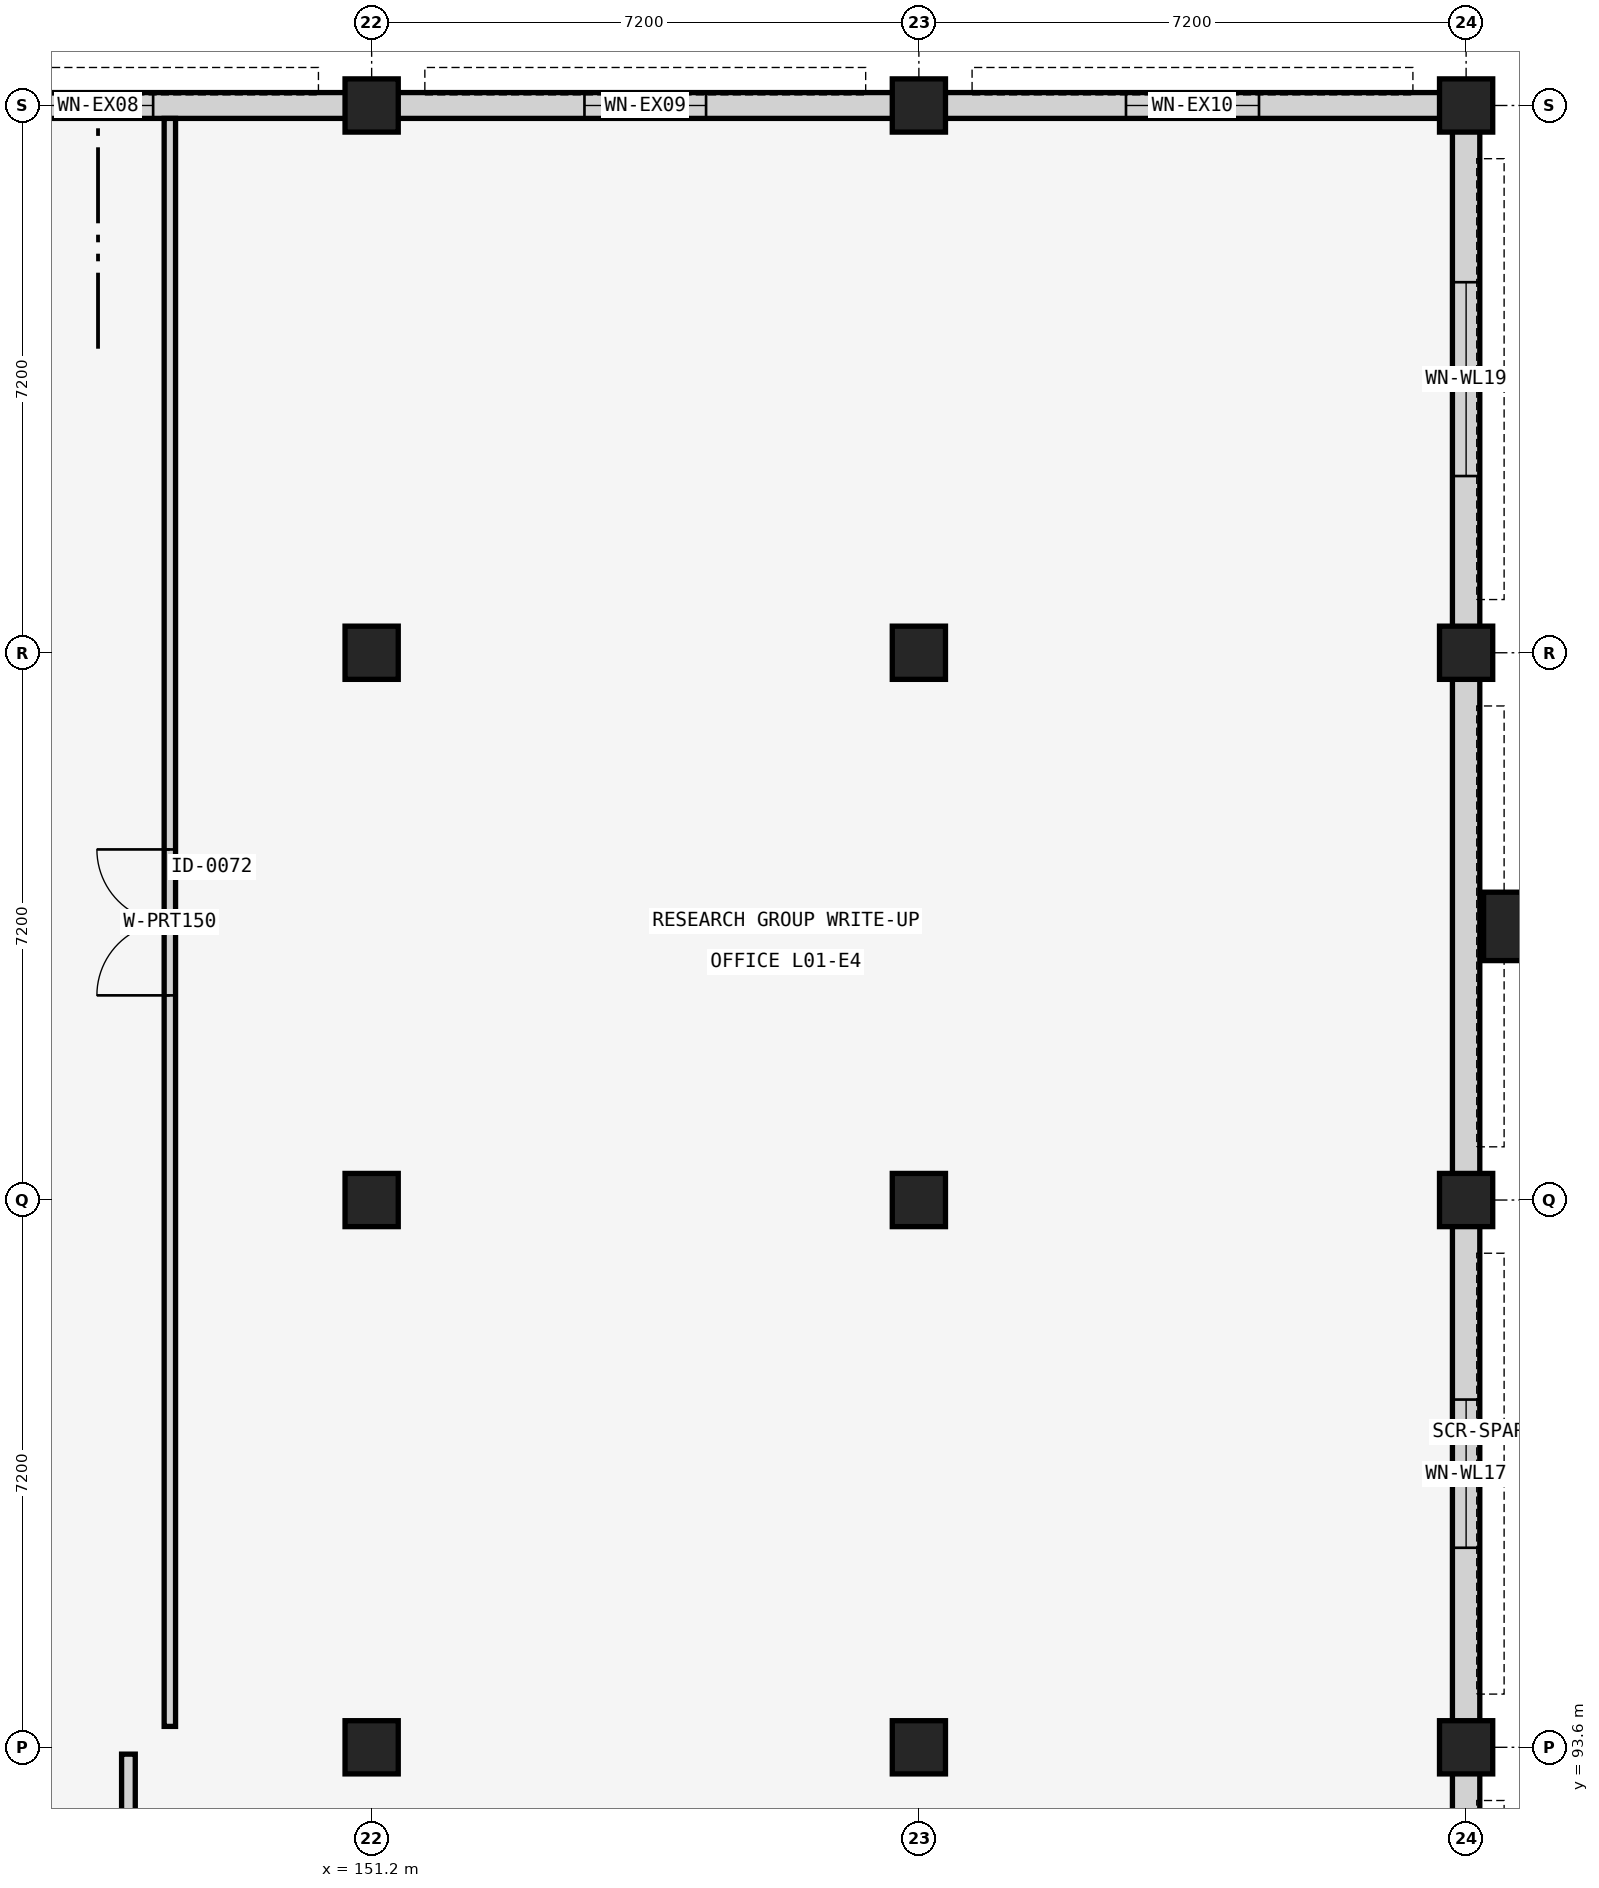
"""IFC4 building model, lengths in metres.
Left out: names, types, materials, properties, quantities, classifications, styles, units other than length and angle.
Written with IfcOpenShell. Run it as: python <this file> out.ifc"""

import sys

from ifc_helpers import new_model, si_unit, direction, frame, frame_2d, origin, origin_2d, place, context, subcontext, project, spatial, rectangle, extrude, element, fill, save


model = new_model("IFC4")
c1 = context("Model", 3, precision=1e-05, world=origin(), true_north=direction((0.0, 1.0)))
c2 = subcontext(c1, "Body", "Model", "MODEL_VIEW")
j1 = project(units=[si_unit("LENGTHUNIT", "METRE"), si_unit("PLANEANGLEUNIT", "RADIAN")], contexts=[c1])
p1 = place(None, origin())
s1 = spatial("IfcSite", under=j1, at=p1, CompositionType="ELEMENT")
p2 = place(p1, origin())
s2 = spatial("IfcBuilding", under=s1, at=p2, CompositionType="ELEMENT")
p3 = place(p2, frame((0.0, 0.0, 4.8)))
s3 = spatial("IfcBuildingStorey", under=s2, at=p3, CompositionType="ELEMENT", Elevation=4.8)
for number, where, z_axis, x_axis in (
    (1, (151.2, 93.6, 0.0), (0.0, 0.0, 1.0), (1.0, 0.0, 0.0)),
    (2, (151.2, 100.8, 0.0), (0.0, 0.0, 1.0), (1.0, 0.0, 0.0)),
    (3, (151.2, 108.0, 0.0), (0.0, 0.0, 1.0), (1.0, 0.0, 0.0)),
    (4, (151.2, 115.2, 0.0), (0.0, 0.0, 1.0), (1.0, 0.0, 0.0)),
    (5, (158.4, 93.6, 0.0), (0.0, 0.0, 1.0), (1.0, 0.0, 0.0)),
    (6, (158.4, 100.8, 0.0), (0.0, 0.0, 1.0), (1.0, 0.0, 0.0)),
    (7, (158.4, 108.0, 0.0), (0.0, 0.0, 1.0), (1.0, 0.0, 0.0)),
    (8, (158.4, 115.2, 0.0), (0.0, 0.0, 1.0), (1.0, 0.0, 0.0)),
    (9, (165.6, 93.6, 0.0), (0.0, 0.0, 1.0), (1.0, 0.0, 0.0)),
    (10, (165.6, 100.8, 0.0), (0.0, 0.0, 1.0), (1.0, 0.0, 0.0)),
    (11, (165.6, 108.0, 0.0), (0.0, 0.0, 1.0), (1.0, 0.0, 0.0)),
    (12, (165.6, 115.2, 0.0), (0.0, 0.0, 1.0), (1.0, 0.0, 0.0)),
):
    element("IfcColumn", number, at=place(p3, frame(where, z_axis=z_axis, x_axis=x_axis)), inside=s3, PredefinedType="COLUMN", context=c2, shape_type="SweptSolid", body=[
        extrude(rectangle(XDim=0.7, YDim=0.7, at=origin_2d()), origin(), (0.0, 0.0, 1.0), 4.16),
    ])
p4 = place(p3, frame((166.08, 104.4, 0.0), z_axis=(0.0, 0.0, 1.0), x_axis=(1.0, 0.0, 0.0)))
e13 = element("IfcColumn", 13, at=p4, inside=s3, PredefinedType="PILASTER", context=c2, shape_type="SweptSolid", body=[
    extrude(rectangle(XDim=0.5, YDim=0.9, at=origin_2d()), origin(), (0.0, 0.0, 1.0), 4.16),
])
p5 = place(p3, frame((165.6, 86.74, 0.0), z_axis=(0.0, 0.0, 1.0), x_axis=(0.0, 1.0, 0.0)))
e14 = element("IfcWall", 14, at=p5, inside=s3, PredefinedType="SOLIDWALL", context=c2, shape_type="SweptSolid", body=[
    extrude(rectangle(XDim=6.52, YDim=0.36, at=frame_2d((3.26, 0.0))), origin(), (0.0, 0.0, 1.0), 3.11),
])
p6 = place(p5, frame((2.435, 0.0, 0.95)))
e15 = element("IfcOpeningElement", 15, at=p6, cuts=e14, PredefinedType="OPENING", context=c2, shape_type="SweptSolid", body=[
    extrude(rectangle(XDim=1.65, YDim=1.95, at=frame_2d((0.825, 0.975))), frame((0.0, 0.19, 0.0), z_axis=(0.0, -1.0, 0.0), x_axis=(1.0, 0.0, 0.0)), (0.0, 0.0, 1.0), 0.38),
])
p7 = place(p3, frame((165.6, 93.94, 0.0), z_axis=(0.0, 0.0, 1.0), x_axis=(0.0, 1.0, 0.0)))
e16 = element("IfcWall", 16, at=p7, inside=s3, PredefinedType="SOLIDWALL", context=c2, shape_type="SweptSolid", body=[
    extrude(rectangle(XDim=6.52, YDim=0.36, at=frame_2d((3.26, 0.0))), origin(), (0.0, 0.0, 1.0), 3.11),
])
p8 = place(p7, frame((2.285, 0.0, 0.95)))
e17 = element("IfcOpeningElement", 17, at=p8, cuts=e16, PredefinedType="OPENING", context=c2, shape_type="SweptSolid", body=[
    extrude(rectangle(XDim=1.95, YDim=1.95, at=frame_2d((0.975, 0.975))), frame((0.0, 0.19, 0.0), z_axis=(0.0, -1.0, 0.0), x_axis=(1.0, 0.0, 0.0)), (0.0, 0.0, 1.0), 0.38),
])
p9 = place(p3, frame((165.6, 101.14, 0.0), z_axis=(0.0, 0.0, 1.0), x_axis=(0.0, 1.0, 0.0)))
e18 = element("IfcWall", 18, at=p9, inside=s3, PredefinedType="SOLIDWALL", context=c2, shape_type="SweptSolid", body=[
    extrude(rectangle(XDim=6.52, YDim=0.36, at=frame_2d((3.26, 0.0))), origin(), (0.0, 0.0, 1.0), 3.11),
])
p10 = place(p3, frame((165.6, 108.34, 0.0), z_axis=(0.0, 0.0, 1.0), x_axis=(0.0, 1.0, 0.0)))
e19 = element("IfcWall", 19, at=p10, inside=s3, PredefinedType="SOLIDWALL", context=c2, shape_type="SweptSolid", body=[
    extrude(rectangle(XDim=6.52, YDim=0.36, at=frame_2d((3.26, 0.0))), origin(), (0.0, 0.0, 1.0), 3.11),
])
p11 = place(p10, frame((1.985, 0.0, 0.95)))
e20 = element("IfcOpeningElement", 20, at=p11, cuts=e19, PredefinedType="OPENING", context=c2, shape_type="SweptSolid", body=[
    extrude(rectangle(XDim=2.55, YDim=1.95, at=frame_2d((1.275, 0.975))), frame((0.0, 0.19, 0.0), z_axis=(0.0, -1.0, 0.0), x_axis=(1.0, 0.0, 0.0)), (0.0, 0.0, 1.0), 0.38),
])
p12 = place(p3, frame((144.34, 115.2, 0.0), z_axis=(0.0, 0.0, 1.0), x_axis=(1.0, 0.0, 0.0)))
e21 = element("IfcWall", 21, at=p12, inside=s3, PredefinedType="SOLIDWALL", context=c2, shape_type="SweptSolid", body=[
    extrude(rectangle(XDim=6.52, YDim=0.34, at=frame_2d((3.26, 0.0))), origin(), (0.0, 0.0, 1.0), 3.21),
])
p13 = place(p12, frame((2.535, 0.0, 0.95)))
e22 = element("IfcOpeningElement", 22, at=p13, cuts=e21, PredefinedType="OPENING", context=c2, shape_type="SweptSolid", body=[
    extrude(rectangle(XDim=1.45, YDim=2.0, at=frame_2d((0.725, 1.0))), frame((0.0, 0.18, 0.0), z_axis=(0.0, -1.0, 0.0), x_axis=(1.0, 0.0, 0.0)), (0.0, 0.0, 1.0), 0.36),
])
p14 = place(p3, frame((151.54, 115.2, 0.0), z_axis=(0.0, 0.0, 1.0), x_axis=(1.0, 0.0, 0.0)))
e23 = element("IfcWall", 23, at=p14, inside=s3, PredefinedType="SOLIDWALL", context=c2, shape_type="SweptSolid", body=[
    extrude(rectangle(XDim=6.52, YDim=0.34, at=frame_2d((3.26, 0.0))), origin(), (0.0, 0.0, 1.0), 3.21),
])
p15 = place(p14, frame((2.46, 0.0, 0.95)))
e24 = element("IfcOpeningElement", 24, at=p15, cuts=e23, PredefinedType="OPENING", context=c2, shape_type="SweptSolid", body=[
    extrude(rectangle(XDim=1.6, YDim=1.7, at=frame_2d((0.8, 0.85))), frame((0.0, 0.18, 0.0), z_axis=(0.0, -1.0, 0.0), x_axis=(1.0, 0.0, 0.0)), (0.0, 0.0, 1.0), 0.36),
])
p16 = place(p3, frame((158.74, 115.2, 0.0), z_axis=(0.0, 0.0, 1.0), x_axis=(1.0, 0.0, 0.0)))
e25 = element("IfcWall", 25, at=p16, inside=s3, PredefinedType="SOLIDWALL", context=c2, shape_type="SweptSolid", body=[
    extrude(rectangle(XDim=6.52, YDim=0.34, at=frame_2d((3.26, 0.0))), origin(), (0.0, 0.0, 1.0), 3.21),
])
p17 = place(p16, frame((2.385, 0.0, 0.95)))
e26 = element("IfcOpeningElement", 26, at=p17, cuts=e25, PredefinedType="OPENING", context=c2, shape_type="SweptSolid", body=[
    extrude(rectangle(XDim=1.75, YDim=1.7, at=frame_2d((0.875, 0.85))), frame((0.0, 0.18, 0.0), z_axis=(0.0, -1.0, 0.0), x_axis=(1.0, 0.0, 0.0)), (0.0, 0.0, 1.0), 0.36),
])
p18 = place(p3, frame((148.0, 71.89, 0.0), z_axis=(0.0, 0.0, 1.0), x_axis=(0.0, 1.0, 0.0)))
e27 = element("IfcWall", 27, at=p18, inside=s3, PredefinedType="PARTITIONING", context=c2, shape_type="SweptSolid", body=[
    extrude(rectangle(XDim=21.62, YDim=0.18, at=frame_2d((10.81, 0.0))), origin(), (0.0, 0.0, 1.0), 3.11),
])
p19 = place(p18, frame((9.89, 0.0, 0.0)))
e28 = element("IfcOpeningElement", 28, at=p19, cuts=e27, PredefinedType="OPENING", context=c2, shape_type="SweptSolid", body=[
    extrude(rectangle(XDim=1.84, YDim=2.26, at=frame_2d((0.92, 1.13))), frame((0.0, 0.1, 0.0), z_axis=(0.0, -1.0, 0.0), x_axis=(1.0, 0.0, 0.0)), (0.0, 0.0, 1.0), 0.2),
])
p20 = place(p3, frame((148.545, 93.875, 0.0), z_axis=(0.0, 0.0, 1.0), x_axis=(0.0, 1.0, 0.0)))
e29 = element("IfcWall", 29, at=p20, inside=s3, PredefinedType="PARTITIONING", context=c2, shape_type="SweptSolid", body=[
    extrude(rectangle(XDim=21.155, YDim=0.15, at=frame_2d((10.578, 0.0))), origin(), (0.0, 0.0, 1.0), 3.11),
])
p21 = place(p20, frame((9.617, 0.0, 0.0)))
e30 = element("IfcOpeningElement", 30, at=p21, cuts=e29, PredefinedType="OPENING", context=c2, shape_type="SweptSolid", body=[
    extrude(rectangle(XDim=1.92, YDim=2.28, at=frame_2d((0.96, 1.14))), frame((0.0, 0.085, 0.0), z_axis=(0.0, -1.0, 0.0), x_axis=(1.0, 0.0, 0.0)), (0.0, 0.0, 1.0), 0.17),
])
p22 = place(p8, origin())
e31 = element("IfcWindow", 31, at=p22, inside=s3, PartitioningType="SINGLE_PANEL", PredefinedType="WINDOW", context=c2, shape_type="SweptSolid", body=[
    extrude(rectangle(XDim=1.95, YDim=1.95, at=frame_2d((0.975, 0.975))), frame((0.0, 0.03, 0.0), z_axis=(0.0, -1.0, 0.0), x_axis=(1.0, 0.0, 0.0)), (0.0, 0.0, 1.0), 0.06),
])
fill(e17, e31)
p23 = place(p11, origin())
e32 = element("IfcWindow", 32, at=p23, inside=s3, PartitioningType="SINGLE_PANEL", PredefinedType="WINDOW", context=c2, shape_type="SweptSolid", body=[
    extrude(rectangle(XDim=2.55, YDim=1.95, at=frame_2d((1.275, 0.975))), frame((0.0, 0.03, 0.0), z_axis=(0.0, -1.0, 0.0), x_axis=(1.0, 0.0, 0.0)), (0.0, 0.0, 1.0), 0.06),
])
fill(e20, e32)
p24 = place(p13, origin())
e33 = element("IfcWindow", 33, at=p24, inside=s3, PartitioningType="SINGLE_PANEL", PredefinedType="WINDOW", context=c2, shape_type="SweptSolid", body=[
    extrude(rectangle(XDim=1.45, YDim=2.0, at=frame_2d((0.725, 1.0))), frame((0.0, 0.03, 0.0), z_axis=(0.0, -1.0, 0.0), x_axis=(1.0, 0.0, 0.0)), (0.0, 0.0, 1.0), 0.06),
])
fill(e22, e33)
p25 = place(p15, origin())
e34 = element("IfcWindow", 34, at=p25, inside=s3, PartitioningType="SINGLE_PANEL", PredefinedType="WINDOW", context=c2, shape_type="SweptSolid", body=[
    extrude(rectangle(XDim=1.6, YDim=1.7, at=frame_2d((0.8, 0.85))), frame((0.0, 0.03, 0.0), z_axis=(0.0, -1.0, 0.0), x_axis=(1.0, 0.0, 0.0)), (0.0, 0.0, 1.0), 0.06),
])
fill(e24, e34)
p26 = place(p17, origin())
e35 = element("IfcWindow", 35, at=p26, inside=s3, PartitioningType="SINGLE_PANEL", PredefinedType="WINDOW", context=c2, shape_type="SweptSolid", body=[
    extrude(rectangle(XDim=1.75, YDim=1.7, at=frame_2d((0.875, 0.85))), frame((0.0, 0.03, 0.0), z_axis=(0.0, -1.0, 0.0), x_axis=(1.0, 0.0, 0.0)), (0.0, 0.0, 1.0), 0.06),
])
fill(e26, e35)
p27 = place(p21, origin())
e36 = element("IfcDoor", 36, at=p27, inside=s3, OperationType="DOUBLE_DOOR_SINGLE_SWING", PredefinedType="DOOR", context=c2, shape_type="SweptSolid", body=[
    extrude(rectangle(XDim=1.92, YDim=2.28, at=frame_2d((0.96, 1.14))), frame((0.0, 0.025, 0.0), z_axis=(0.0, -1.0, 0.0), x_axis=(1.0, 0.0, 0.0)), (0.0, 0.0, 1.0), 0.05),
])
fill(e30, e36)
save(model, sys.argv[1])
